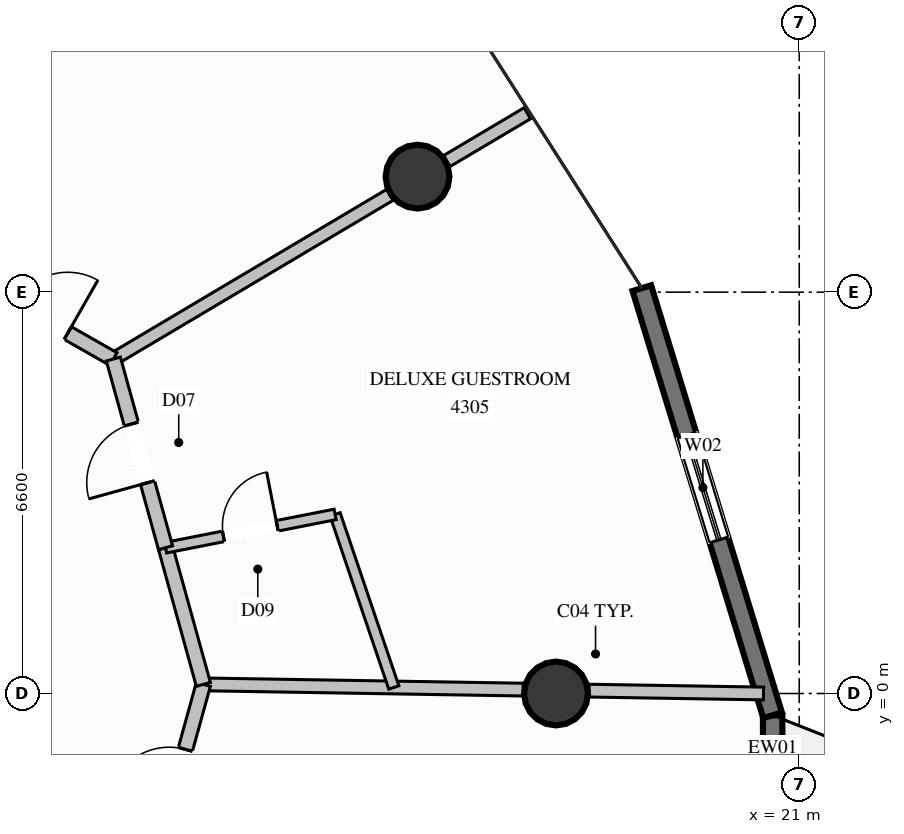
"""IFC4 building model, lengths in metres.
Left out: names, types, materials, properties, quantities, classifications, styles, units other than length and angle.
Written with IfcOpenShell. Run it as: python <this file> out.ifc"""

import sys

from ifc_helpers import new_model, si_unit, direction, frame, frame_2d, origin, origin_2d, place, context, subcontext, project, spatial, rectangle, circle, extrude, element, fill, save


model = new_model("IFC4")
c1 = context("Model", 3, precision=1e-05, world=origin(), true_north=direction((0.0, 1.0)))
c2 = subcontext(c1, "Body", "Model", "MODEL_VIEW")
j1 = project(units=[si_unit("LENGTHUNIT", "METRE"), si_unit("PLANEANGLEUNIT", "RADIAN")], contexts=[c1])
p1 = place(None, origin())
s1 = spatial("IfcSite", under=j1, at=p1, CompositionType="ELEMENT")
p2 = place(p1, origin())
s2 = spatial("IfcBuilding", under=s1, at=p2, CompositionType="ELEMENT")
p3 = place(p2, frame((0.0, 0.0, 160.2)))
s3 = spatial("IfcBuildingStorey", under=s2, at=p3, CompositionType="ELEMENT", Elevation=160.2)
for number, where, z_axis, x_axis in (
    (1, (17.0, 0.0, 0.0), (0.0, 0.0, 1.0), (1.0, 0.0, 0.0)),
    (2, (14.722, 8.5, 0.0), (0.0, 0.0, 1.0), (1.0, 0.0, 0.0)),
):
    element("IfcColumn", number, at=place(p3, frame(where, z_axis=z_axis, x_axis=x_axis)), inside=s3, PredefinedType="COLUMN", context=c2, shape_type="SweptSolid", body=[
        extrude(circle(Radius=0.525, at=origin_2d()), origin(), (0.0, 0.0, 1.0), 3.6),
    ])
p4 = place(p3, frame((20.562, -0.358, 0.0), z_axis=(0.0, 0.0, 1.0), x_axis=(0.003876887493, -0.999992484843, 0.0)))
e3 = element("IfcWall", 3, at=p4, inside=s3, PredefinedType="SOLIDWALL", context=c2, shape_type="SweptSolid", body=[
    extrude(rectangle(XDim=6.99, YDim=0.32, at=frame_2d((3.495, 0.0))), origin(), (0.0, 0.0, 1.0), 3.2),
])
p5 = place(p4, frame((4.768, 0.0, 0.35)))
e4 = element("IfcOpeningElement", 4, at=p5, cuts=e3, PredefinedType="OPENING", context=c2, shape_type="SweptSolid", body=[
    extrude(rectangle(XDim=1.8, YDim=2.6, at=frame_2d((0.9, 1.3))), frame((0.0, 0.17, 0.0), z_axis=(0.0, -1.0, 0.0), x_axis=(1.0, 0.0, 0.0)), (0.0, 0.0, 1.0), 0.34),
])
p6 = place(p4, frame((2.695, 0.0, 0.0)))
e5 = element("IfcOpeningElement", 5, at=p6, cuts=e3, PredefinedType="OPENING", context=c2, shape_type="SweptSolid", body=[
    extrude(rectangle(XDim=1.6, YDim=2.3, at=frame_2d((0.8, 1.15))), frame((0.0, 0.17, 0.0), z_axis=(0.0, -1.0, 0.0), x_axis=(1.0, 0.0, 0.0)), (0.0, 0.0, 1.0), 0.34),
])
p7 = place(p3, frame((18.411, 6.666, 0.0), z_axis=(0.0, 0.0, 1.0), x_axis=(0.292831477481, -0.956164068451, 0.0)))
e6 = element("IfcWall", 6, at=p7, inside=s3, PredefinedType="SOLIDWALL", context=c2, shape_type="SweptSolid", body=[
    extrude(rectangle(XDim=7.346, YDim=0.32, at=frame_2d((3.673, 0.0))), origin(), (0.0, 0.0, 1.0), 3.2),
])
p8 = place(p7, frame((2.53, 0.0, 0.35)))
e7 = element("IfcOpeningElement", 7, at=p8, cuts=e6, PredefinedType="OPENING", context=c2, shape_type="SweptSolid", body=[
    extrude(rectangle(XDim=1.8, YDim=2.6, at=frame_2d((0.9, 1.3))), frame((0.0, 0.17, 0.0), z_axis=(0.0, -1.0, 0.0), x_axis=(1.0, 0.0, 0.0)), (0.0, 0.0, 1.0), 0.34),
])
p9 = place(p3, frame((11.2, 0.15, 0.0), z_axis=(0.0, 0.0, 1.0), x_axis=(0.999866513716, -0.016338749957, 0.0)))
e8 = element("IfcWall", 8, at=p9, inside=s3, PredefinedType="PARTITIONING", context=c2, shape_type="SweptSolid", body=[
    extrude(rectangle(XDim=5.26, YDim=0.21, at=frame_2d((2.63, 0.0))), origin(), (0.0, 0.0, 1.0), 2.067),
])
p10 = place(p3, frame((17.543, 0.047, 0.0), z_axis=(0.0, 0.0, 1.0), x_axis=(0.999865174134, -0.016420522346, 0.0)))
e9 = element("IfcWall", 9, at=p10, inside=s3, PredefinedType="PARTITIONING", context=c2, shape_type="SweptSolid", body=[
    extrude(rectangle(XDim=2.87, YDim=0.21, at=frame_2d((1.435, 0.0))), origin(), (0.0, 0.0, 1.0), 3.2),
])
p11 = place(p3, frame((9.72, 5.5, 0.0), z_axis=(0.0, 0.0, 1.0), x_axis=(0.859846510469, 0.510552620632, 0.0)))
e10 = element("IfcWall", 10, at=p11, inside=s3, PredefinedType="PARTITIONING", context=c2, shape_type="SweptSolid", body=[
    extrude(rectangle(XDim=5.288, YDim=0.21, at=frame_2d((2.644, 0.0))), origin(), (0.0, 0.0, 1.0), 2.067),
])
p12 = place(p3, frame((15.203, 8.756, 0.0), z_axis=(0.0, 0.0, 1.0), x_axis=(0.860124178644, 0.510084696215, 0.0)))
e11 = element("IfcWall", 11, at=p12, inside=s3, PredefinedType="PARTITIONING", context=c2, shape_type="SweptSolid", body=[
    extrude(rectangle(XDim=1.541, YDim=0.21, at=frame_2d((0.771, 0.0))), origin(), (0.0, 0.0, 1.0), 3.2),
])
p13 = place(p3, frame((7.35, 6.85, 0.0), z_axis=(0.0, 0.0, 1.0), x_axis=(0.868892391395, -0.495001022398, 0.0)))
e12 = element("IfcWall", 12, at=p13, inside=s3, PredefinedType="PARTITIONING", context=c2, shape_type="SweptSolid", body=[
    extrude(rectangle(XDim=2.728, YDim=0.24, at=frame_2d((1.364, 0.0))), origin(), (0.0, 0.0, 1.0), 3.2),
])
p14 = place(p13, frame((0.864, 0.0, 0.0)))
e13 = element("IfcOpeningElement", 13, at=p14, cuts=e12, PredefinedType="OPENING", context=c2, shape_type="SweptSolid", body=[
    extrude(rectangle(XDim=1.0, YDim=2.2, at=frame_2d((0.5, 1.1))), frame((0.0, 0.13, 0.0), z_axis=(0.0, -1.0, 0.0), x_axis=(1.0, 0.0, 0.0)), (0.0, 0.0, 1.0), 0.26),
])
p15 = place(p3, frame((10.342, -2.953, 0.0), z_axis=(0.0, 0.0, 1.0), x_axis=(0.266497617314, 0.963835577246, 0.0)))
e14 = element("IfcWall", 14, at=p15, inside=s3, PredefinedType="PARTITIONING", context=c2, shape_type="SweptSolid", body=[
    extrude(rectangle(XDim=3.219, YDim=0.24, at=frame_2d((1.61, 0.0))), origin(), (0.0, 0.0, 1.0), 3.2),
])
p16 = place(p15, frame((1.11, 0.0, 0.0)))
e15 = element("IfcOpeningElement", 15, at=p16, cuts=e14, PredefinedType="OPENING", context=c2, shape_type="SweptSolid", body=[
    extrude(rectangle(XDim=1.0, YDim=2.2, at=frame_2d((0.5, 1.1))), frame((0.0, 0.13, 0.0), z_axis=(0.0, -1.0, 0.0), x_axis=(1.0, 0.0, 0.0)), (0.0, 0.0, 1.0), 0.26),
])
p17 = place(p3, frame((11.2, 0.15, 0.0), z_axis=(0.0, 0.0, 1.0), x_axis=(-0.266801280383, 0.963751563831, 0.0)))
e16 = element("IfcWall", 16, at=p17, inside=s3, PredefinedType="PARTITIONING", context=c2, shape_type="SweptSolid", body=[
    extrude(rectangle(XDim=2.332, YDim=0.24, at=frame_2d((1.166, 0.0))), origin(), (0.0, 0.0, 1.0), 3.2),
])
p18 = place(p3, frame((14.332, 0.099, 0.0), z_axis=(0.0, 0.0, 1.0), x_axis=(-0.32114672857, 0.947029449769, 0.0)))
e17 = element("IfcWall", 17, at=p18, inside=s3, PredefinedType="PLUMBINGWALL", context=c2, shape_type="SweptSolid", body=[
    extrude(rectangle(XDim=3.005, YDim=0.175, at=frame_2d((1.502, 0.0))), origin(), (0.0, 0.0, 1.0), 3.2),
])
p19 = place(p3, frame((10.578, 2.397, 0.0), z_axis=(0.0, 0.0, 1.0), x_axis=(0.981232572148, 0.192828004593, 0.0)))
e18 = element("IfcWall", 18, at=p19, inside=s3, PredefinedType="PLUMBINGWALL", context=c2, shape_type="SweptSolid", body=[
    extrude(rectangle(XDim=2.842, YDim=0.175, at=frame_2d((1.421, 0.0))), origin(), (0.0, 0.0, 1.0), 3.2),
])
p20 = place(p19, frame((0.971, 0.0, 0.0)))
e19 = element("IfcOpeningElement", 19, at=p20, cuts=e18, PredefinedType="OPENING", context=c2, shape_type="SweptSolid", body=[
    extrude(rectangle(XDim=0.9, YDim=2.1, at=frame_2d((0.45, 1.05))), frame((0.0, 0.098, 0.0), z_axis=(0.0, -1.0, 0.0), x_axis=(1.0, 0.0, 0.0)), (0.0, 0.0, 1.0), 0.195),
])
p21 = place(p3, frame((10.578, 2.397, 0.0), z_axis=(0.0, 0.0, 1.0), x_axis=(-0.266478138733, 0.963840962803, 0.0)))
e20 = element("IfcWall", 20, at=p21, inside=s3, PredefinedType="PARTITIONING", context=c2, shape_type="SweptSolid", body=[
    extrude(rectangle(XDim=3.219, YDim=0.24, at=frame_2d((1.61, 0.0))), origin(), (0.0, 0.0, 1.0), 3.2),
])
p22 = place(p21, frame((1.11, 0.0, 0.0)))
e21 = element("IfcOpeningElement", 21, at=p22, cuts=e20, PredefinedType="OPENING", context=c2, shape_type="SweptSolid", body=[
    extrude(rectangle(XDim=1.0, YDim=2.2, at=frame_2d((0.5, 1.1))), frame((0.0, 0.13, 0.0), z_axis=(0.0, -1.0, 0.0), x_axis=(1.0, 0.0, 0.0)), (0.0, 0.0, 1.0), 0.26),
])
p23 = place(p8, origin())
e22 = element("IfcWindow", 22, at=p23, inside=s3, PartitioningType="SINGLE_PANEL", PredefinedType="WINDOW", context=c2, shape_type="SweptSolid", body=[
    extrude(rectangle(XDim=1.8, YDim=2.6, at=frame_2d((0.9, 1.3))), frame((0.0, 0.03, 0.0), z_axis=(0.0, -1.0, 0.0), x_axis=(1.0, 0.0, 0.0)), (0.0, 0.0, 1.0), 0.06),
])
fill(e7, e22)
p24 = place(p14, origin())
e23 = element("IfcDoor", 23, at=p24, inside=s3, OperationType="SINGLE_SWING_RIGHT", PredefinedType="DOOR", context=c2, shape_type="SweptSolid", body=[
    extrude(rectangle(XDim=1.0, YDim=2.2, at=frame_2d((0.5, 1.1))), frame((0.0, 0.025, 0.0), z_axis=(0.0, -1.0, 0.0), x_axis=(1.0, 0.0, 0.0)), (0.0, 0.0, 1.0), 0.05),
])
fill(e13, e23)
p25 = place(p16, origin())
e24 = element("IfcDoor", 24, at=p25, inside=s3, OperationType="SINGLE_SWING_LEFT", PredefinedType="DOOR", context=c2, shape_type="SweptSolid", body=[
    extrude(rectangle(XDim=1.0, YDim=2.2, at=frame_2d((0.5, 1.1))), frame((0.0, 0.025, 0.0), z_axis=(0.0, -1.0, 0.0), x_axis=(1.0, 0.0, 0.0)), (0.0, 0.0, 1.0), 0.05),
])
fill(e15, e24)
p26 = place(p20, origin())
e25 = element("IfcDoor", 25, at=p26, inside=s3, OperationType="SINGLE_SWING_RIGHT", PredefinedType="DOOR", context=c2, shape_type="SweptSolid", body=[
    extrude(rectangle(XDim=0.9, YDim=2.1, at=frame_2d((0.45, 1.05))), frame((0.0, 0.025, 0.0), z_axis=(0.0, -1.0, 0.0), x_axis=(1.0, 0.0, 0.0)), (0.0, 0.0, 1.0), 0.05),
])
fill(e19, e25)
p27 = place(p22, origin())
e26 = element("IfcDoor", 26, at=p27, inside=s3, OperationType="SINGLE_SWING_LEFT", PredefinedType="DOOR", context=c2, shape_type="SweptSolid", body=[
    extrude(rectangle(XDim=1.0, YDim=2.2, at=frame_2d((0.5, 1.1))), frame((0.0, 0.025, 0.0), z_axis=(0.0, -1.0, 0.0), x_axis=(1.0, 0.0, 0.0)), (0.0, 0.0, 1.0), 0.05),
])
fill(e21, e26)
save(model, sys.argv[1])
